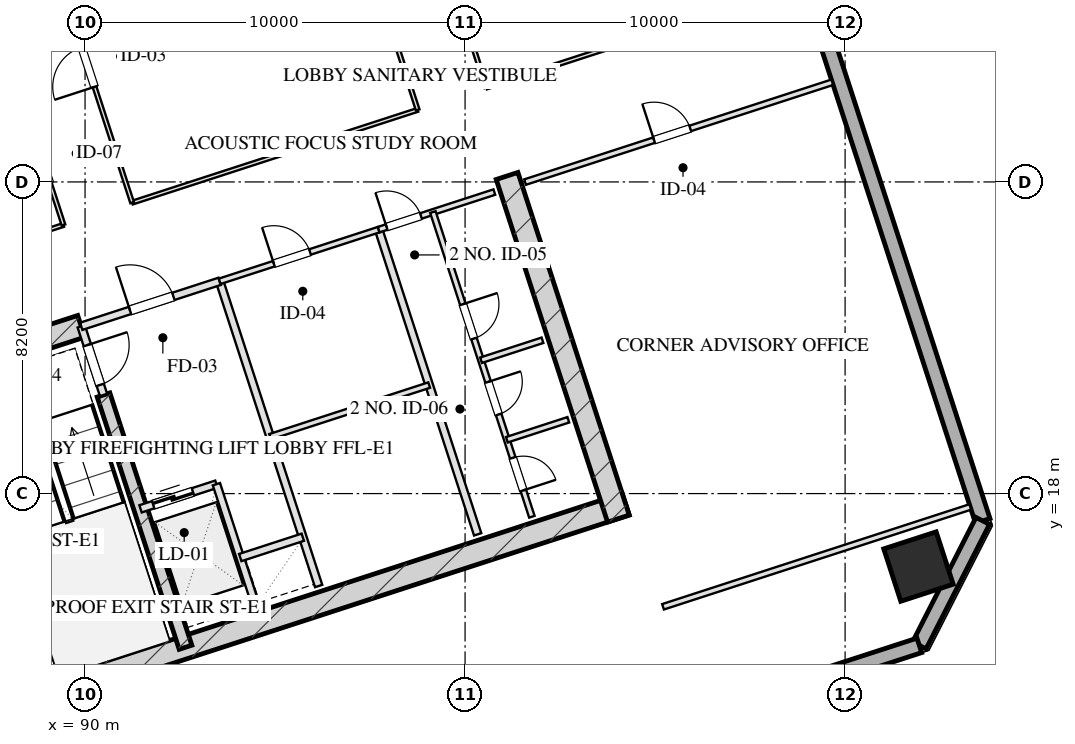
"""IFC4 building model, lengths in metres.
Left out: names, types, materials, properties, quantities, classifications, styles, units other than length and angle.
Written with IfcOpenShell. Run it as: python <this file> out.ifc"""

import sys

from ifc_helpers import new_model, si_unit, direction, frame, frame_2d, origin, origin_2d, place, context, subcontext, project, spatial, rectangle, hollow_rectangle, extrude, element, fill, save


model = new_model("IFC4")
c1 = context("Model", 3, precision=1e-05, world=origin(), true_north=direction((0.0, 1.0)))
c2 = subcontext(c1, "Body", "Model", "MODEL_VIEW")
j1 = project(units=[si_unit("LENGTHUNIT", "METRE"), si_unit("PLANEANGLEUNIT", "RADIAN")], contexts=[c1])
p1 = place(None, origin())
s1 = spatial("IfcSite", under=j1, at=p1, CompositionType="ELEMENT")
p2 = place(p1, origin())
s2 = spatial("IfcBuilding", under=s1, at=p2, CompositionType="ELEMENT")
p3 = place(p2, frame((0.0, 0.0, 106.95)))
s3 = spatial("IfcBuildingStorey", under=s2, at=p3, CompositionType="ELEMENT", Elevation=106.95)
p4 = place(p3, frame((88.63, 12.652, 0.0), z_axis=(0.0, 0.0, 1.0), x_axis=(0.95105714907, 0.309015046886, 0.0)))
e1 = element("IfcWall", 1, at=p4, inside=s3, PredefinedType="SHEAR", context=c2, shape_type="SweptSolid", body=[
    extrude(rectangle(XDim=16.4, YDim=0.6, at=frame_2d((8.2, 0.0))), origin(), (0.0, 0.0, 1.0), 3.45),
])
p5 = place(p3, frame((86.078, 21.475, 0.0), z_axis=(0.0, 0.0, 1.0), x_axis=(0.309017938678, -0.951056209472, 0.0)))
e2 = element("IfcWall", 2, at=p5, inside=s3, PredefinedType="SHEAR", context=c2, shape_type="SweptSolid", body=[
    extrude(rectangle(XDim=9.48, YDim=0.6, at=frame_2d((4.74, 0.0))), origin(), (0.0, 0.0, 1.0), 3.45),
])
p6 = place(p3, frame((101.105, 26.358, 0.0), z_axis=(0.0, 0.0, 1.0), x_axis=(0.309010370028, -0.95105866865, 0.0)))
e3 = element("IfcWall", 3, at=p6, inside=s3, PredefinedType="SHEAR", context=c2, shape_type="SweptSolid", body=[
    extrude(rectangle(XDim=9.48, YDim=0.6, at=frame_2d((4.74, 0.0))), origin(), (0.0, 0.0, 1.0), 3.45),
])
p7 = place(p3, frame((90.486, 20.594, 0.0), z_axis=(0.0, 0.0, 1.0), x_axis=(0.309020428229, -0.951055400562, 0.0)))
e4 = element("IfcWall", 4, at=p7, inside=s3, PredefinedType="SHEAR", context=c2, shape_type="SweptSolid", body=[
    extrude(rectangle(XDim=6.98, YDim=0.35, at=frame_2d((3.49, 0.0))), origin(), (0.0, 0.0, 1.0), 3.45),
])
p8 = place(p3, frame((85.886, 21.097, 0.0), z_axis=(0.0, 0.0, 1.0), x_axis=(0.951068073652, 0.308981422225, 0.0)))
e5 = element("IfcWall", 5, at=p8, inside=s3, PredefinedType="SHEAR", context=c2, shape_type="SweptSolid", body=[
    extrude(rectangle(XDim=4.22, YDim=0.6, at=frame_2d((2.11, 0.0))), origin(), (0.0, 0.0, 1.0), 3.45),
])
p9 = place(p3, frame((111.931, 16.08, 0.0), z_axis=(0.0, 0.0, 1.0), x_axis=(0.951056516295, 0.309016994375, 0.0)))
e6 = element("IfcColumn", 6, at=p9, inside=s3, PredefinedType="COLUMN", context=c2, shape_type="SweptSolid", body=[
    extrude(hollow_rectangle(XDim=1.45, YDim=1.45, WallThickness=0.05, at=origin_2d()), origin(), (0.0, 0.0, 1.0), 3.451),
])
p10 = place(p3, frame((99.284, 61.41, 0.0), z_axis=(0.0, 0.0, 1.0), x_axis=(0.309017542002, -0.95105633836, 0.0)))
e7 = element("IfcWall", 7, at=p10, inside=s3, PredefinedType="SOLIDWALL", context=c2, shape_type="SweptSolid", body=[
    extrude(rectangle(XDim=46.4, YDim=0.4, at=frame_2d((23.2, 0.0))), origin(), (0.0, 0.0, 1.0), 2.61),
])
p11 = place(p10, frame((28.4, 0.0, 0.75)))
e8 = element("IfcOpeningElement", 8, at=p11, cuts=e7, PredefinedType="OPENING", context=c2, shape_type="SweptSolid", body=[
    extrude(rectangle(XDim=2.4, YDim=1.46, at=frame_2d((1.2, 0.73))), frame((0.0, 0.21, 0.0), z_axis=(0.0, -1.0, 0.0), x_axis=(1.0, 0.0, 0.0)), (0.0, 0.0, 1.0), 0.42),
])
p12 = place(p10, frame((15.6, 0.0, 0.75)))
e9 = element("IfcOpeningElement", 9, at=p12, cuts=e7, PredefinedType="OPENING", context=c2, shape_type="SweptSolid", body=[
    extrude(rectangle(XDim=2.4, YDim=1.46, at=frame_2d((1.2, 0.73))), frame((0.0, 0.21, 0.0), z_axis=(0.0, -1.0, 0.0), x_axis=(1.0, 0.0, 0.0)), (0.0, 0.0, 1.0), 0.42),
])
p13 = place(p3, frame((113.623, 17.281, 0.0), z_axis=(0.0, 0.0, 1.0), x_axis=(-0.454026238093, -0.890988313685, 0.0)))
e10 = element("IfcWall", 10, at=p13, inside=s3, PredefinedType="SOLIDWALL", context=c2, shape_type="SweptSolid", body=[
    extrude(rectangle(XDim=3.677, YDim=0.4, at=frame_2d((1.838, 0.0))), origin(), (0.0, 0.0, 1.0), 2.61),
])
p14 = place(p3, frame((111.953, 14.005, 0.0), z_axis=(0.0, 0.0, 1.0), x_axis=(-0.95105505922, -0.309021478754, 0.0)))
e11 = element("IfcWall", 11, at=p14, inside=s3, PredefinedType="SOLIDWALL", context=c2, shape_type="SweptSolid", body=[
    extrude(rectangle(XDim=29.4, YDim=0.4, at=frame_2d((14.7, 0.0))), origin(), (0.0, 0.0, 1.0), 2.61),
])
p15 = place(p3, frame((89.899, 22.401, 0.0), z_axis=(0.0, 0.0, 1.0), x_axis=(0.308932062672, -0.951084108086, 0.0)))
e12 = element("IfcWall", 12, at=p15, inside=s3, PredefinedType="PARTITIONING", context=c2, shape_type="SweptSolid", body=[
    extrude(rectangle(XDim=1.9, YDim=0.2, at=frame_2d((0.95, 0.0))), origin(), (0.0, 0.0, 1.0), 3.175),
])
p16 = place(p15, frame((0.52, 0.0, 0.0)))
e13 = element("IfcOpeningElement", 13, at=p16, cuts=e12, PredefinedType="OPENING", context=c2, shape_type="SweptSolid", body=[
    extrude(rectangle(XDim=1.1, YDim=2.05, at=frame_2d((0.55, 1.025))), frame((0.0, 0.11, 0.0), z_axis=(0.0, -1.0, 0.0), x_axis=(1.0, 0.0, 0.0)), (0.0, 0.0, 1.0), 0.22),
])
p17 = place(p3, frame((93.542, 23.585, 0.0), z_axis=(0.0, 0.0, 1.0), x_axis=(0.309042196757, -0.951048327176, 0.0)))
e14 = element("IfcWall", 14, at=p17, inside=s3, PredefinedType="PARTITIONING", context=c2, shape_type="SweptSolid", body=[
    extrude(rectangle(XDim=8.43, YDim=0.2, at=frame_2d((4.215, 0.0))), origin(), (0.0, 0.0, 1.0), 3.175),
])
p18 = place(p3, frame((89.899, 22.401, 0.0), z_axis=(0.0, 0.0, 1.0), x_axis=(0.951046716504, 0.309047153403, 0.0)))
e15 = element("IfcWall", 15, at=p18, inside=s3, PredefinedType="PARTITIONING", context=c2, shape_type="SweptSolid", body=[
    extrude(rectangle(XDim=3.83, YDim=0.2, at=frame_2d((1.915, 0.0))), origin(), (0.0, 0.0, 1.0), 3.175),
])
p19 = place(p18, frame((1.35, 0.0, 0.0)))
e16 = element("IfcOpeningElement", 16, at=p19, cuts=e15, PredefinedType="OPENING", context=c2, shape_type="SweptSolid", body=[
    extrude(rectangle(XDim=1.2, YDim=2.05, at=frame_2d((0.6, 1.025))), frame((0.0, 0.11, 0.0), z_axis=(0.0, -1.0, 0.0), x_axis=(1.0, 0.0, 0.0)), (0.0, 0.0, 1.0), 0.22),
])
p20 = place(p3, frame((91.46, 17.598, 0.0), z_axis=(0.0, 0.0, 1.0), x_axis=(0.951062257173, 0.308999325213, 0.0)))
e17 = element("IfcWall", 17, at=p20, inside=s3, PredefinedType="PARTITIONING", context=c2, shape_type="SweptSolid", body=[
    extrude(rectangle(XDim=2.1, YDim=0.2, at=frame_2d((1.05, 0.0))), origin(), (0.0, 0.0, 1.0), 3.175),
])
p21 = place(p20, frame((0.35, 0.0, 0.0)))
e18 = element("IfcOpeningElement", 18, at=p21, cuts=e17, PredefinedType="OPENING", context=c2, shape_type="SweptSolid", body=[
    extrude(rectangle(XDim=1.1, YDim=2.05, at=frame_2d((0.55, 1.025))), frame((0.0, 0.11, 0.0), z_axis=(0.0, -1.0, 0.0), x_axis=(1.0, 0.0, 0.0)), (0.0, 0.0, 1.0), 0.22),
])
p22 = place(p3, frame((93.457, 18.247, 0.0), z_axis=(0.0, 0.0, 1.0), x_axis=(0.3089935693, -0.951064127245, 0.0)))
e19 = element("IfcWall", 19, at=p22, inside=s3, PredefinedType="PARTITIONING", context=c2, shape_type="SweptSolid", body=[
    extrude(rectangle(XDim=3.7, YDim=0.2, at=frame_2d((1.85, 0.0))), origin(), (0.0, 0.0, 1.0), 3.175),
])
p23 = place(p3, frame((94.084, 16.317, 0.0), z_axis=(0.0, 0.0, 1.0), x_axis=(0.951041328149, 0.309063734775, 0.0)))
e20 = element("IfcWall", 20, at=p23, inside=s3, PredefinedType="PARTITIONING", context=c2, shape_type="SweptSolid", body=[
    extrude(rectangle(XDim=1.73, YDim=0.2, at=frame_2d((0.865, 0.0))), origin(), (0.0, 0.0, 1.0), 3.175),
])
p24 = place(p3, frame((97.727, 24.944, 0.0), z_axis=(0.0, 0.0, 1.0), x_axis=(0.309016001439, -0.951056838919, 0.0)))
e21 = element("IfcWall", 21, at=p24, inside=s3, PredefinedType="PARTITIONING", context=c2, shape_type="SweptSolid", body=[
    extrude(rectangle(XDim=8.43, YDim=0.2, at=frame_2d((4.215, 0.0))), origin(), (0.0, 0.0, 1.0), 3.175),
])
p25 = place(p3, frame((93.542, 23.585, 0.0), z_axis=(0.0, 0.0, 1.0), x_axis=(0.951063829732, 0.308994485023, 0.0)))
e22 = element("IfcWall", 22, at=p25, inside=s3, PredefinedType="PARTITIONING", context=c2, shape_type="SweptSolid", body=[
    extrude(rectangle(XDim=4.4, YDim=0.15, at=frame_2d((2.2, 0.0))), origin(), (0.0, 0.0, 1.0), 3.175),
])
p26 = place(p25, frame((1.5, 0.0, 0.0)))
e23 = element("IfcOpeningElement", 23, at=p26, cuts=e22, PredefinedType="OPENING", context=c2, shape_type="SweptSolid", body=[
    extrude(rectangle(XDim=1.0, YDim=2.05, at=frame_2d((0.5, 1.025))), frame((0.0, 0.085, 0.0), z_axis=(0.0, -1.0, 0.0), x_axis=(1.0, 0.0, 0.0)), (0.0, 0.0, 1.0), 0.17),
])
p27 = place(p3, frame((94.871, 19.495, 0.0), z_axis=(0.0, 0.0, 1.0), x_axis=(0.951042223598, 0.309060979314, 0.0)))
e24 = element("IfcWall", 24, at=p27, inside=s3, PredefinedType="PARTITIONING", context=c2, shape_type="SweptSolid", body=[
    extrude(rectangle(XDim=4.4, YDim=0.15, at=frame_2d((2.2, 0.0))), origin(), (0.0, 0.0, 1.0), 3.175),
])
p28 = place(p3, frame((97.727, 24.944, 0.0), z_axis=(0.0, 0.0, 1.0), x_axis=(0.951036872128, 0.309077446369, 0.0)))
e25 = element("IfcWall", 25, at=p28, inside=s3, PredefinedType="PARTITIONING", context=c2, shape_type="SweptSolid", body=[
    extrude(rectangle(XDim=3.2, YDim=0.15, at=frame_2d((1.6, 0.0))), origin(), (0.0, 0.0, 1.0), 3.175),
])
p29 = place(p28, frame((0.22, 0.0, 0.0)))
e26 = element("IfcOpeningElement", 26, at=p29, cuts=e25, PredefinedType="OPENING", context=c2, shape_type="SweptSolid", body=[
    extrude(rectangle(XDim=0.95, YDim=2.05, at=frame_2d((0.475, 1.025))), frame((0.0, 0.085, 0.0), z_axis=(0.0, -1.0, 0.0), x_axis=(1.0, 0.0, 0.0)), (0.0, 0.0, 1.0), 0.17),
])
p30 = place(p3, frame((99.153, 25.408, 0.0), z_axis=(0.0, 0.0, 1.0), x_axis=(0.309016001439, -0.951056838919, 0.0)))
e27 = element("IfcWall", 27, at=p30, inside=s3, PredefinedType="PARTITIONING", context=c2, shape_type="SweptSolid", body=[
    extrude(rectangle(XDim=8.43, YDim=0.15, at=frame_2d((4.215, 0.0))), origin(), (0.0, 0.0, 1.0), 3.175),
])
p31 = place(p30, frame((2.55, 0.0, 0.0)))
e28 = element("IfcOpeningElement", 28, at=p31, cuts=e27, PredefinedType="OPENING", context=c2, shape_type="SweptSolid", body=[
    extrude(rectangle(XDim=0.95, YDim=2.05, at=frame_2d((0.475, 1.025))), frame((0.0, 0.085, 0.0), z_axis=(0.0, -1.0, 0.0), x_axis=(1.0, 0.0, 0.0)), (0.0, 0.0, 1.0), 0.17),
])
p32 = place(p30, frame((4.7, 0.0, 0.0)))
e29 = element("IfcOpeningElement", 29, at=p32, cuts=e27, PredefinedType="OPENING", context=c2, shape_type="SweptSolid", body=[
    extrude(rectangle(XDim=0.9, YDim=2.05, at=frame_2d((0.45, 1.025))), frame((0.0, 0.085, 0.0), z_axis=(0.0, -1.0, 0.0), x_axis=(1.0, 0.0, 0.0)), (0.0, 0.0, 1.0), 0.17),
])
p33 = place(p30, frame((6.8, 0.0, 0.0)))
e30 = element("IfcOpeningElement", 30, at=p33, cuts=e27, PredefinedType="OPENING", context=c2, shape_type="SweptSolid", body=[
    extrude(rectangle(XDim=0.9, YDim=2.05, at=frame_2d((0.45, 1.025))), frame((0.0, 0.085, 0.0), z_axis=(0.0, -1.0, 0.0), x_axis=(1.0, 0.0, 0.0)), (0.0, 0.0, 1.0), 0.17),
])
p34 = place(p3, frame((100.42, 21.509, 0.0), z_axis=(0.0, 0.0, 1.0), x_axis=(0.951040401051, 0.309066587596, 0.0)))
e31 = element("IfcWall", 31, at=p34, inside=s3, PredefinedType="PARTITIONING", context=c2, shape_type="SweptSolid", body=[
    extrude(rectangle(XDim=1.7, YDim=0.15, at=frame_2d((0.85, 0.0))), origin(), (0.0, 0.0, 1.0), 3.175),
])
p35 = place(p3, frame((101.1, 19.416, 0.0), z_axis=(0.0, 0.0, 1.0), x_axis=(0.951054116971, 0.309024378638, 0.0)))
e32 = element("IfcWall", 32, at=p35, inside=s3, PredefinedType="PARTITIONING", context=c2, shape_type="SweptSolid", body=[
    extrude(rectangle(XDim=1.7, YDim=0.15, at=frame_2d((0.85, 0.0))), origin(), (0.0, 0.0, 1.0), 3.175),
])
p36 = place(p3, frame((105.209, 15.021, 0.0), z_axis=(0.0, 0.0, 1.0), x_axis=(0.951054329824, 0.309023723562, 0.0)))
e33 = element("IfcWall", 33, at=p36, inside=s3, PredefinedType="PARTITIONING", context=c2, shape_type="SweptSolid", body=[
    extrude(rectangle(XDim=8.5, YDim=0.15, at=frame_2d((4.25, 0.0))), origin(), (0.0, 0.0, 1.0), 3.175),
])
p37 = place(p3, frame((101.578, 26.196, 0.0), z_axis=(0.0, 0.0, 1.0), x_axis=(0.951062770994, 0.308997743729, 0.0)))
e34 = element("IfcWall", 34, at=p37, inside=s3, PredefinedType="PARTITIONING", context=c2, shape_type="SweptSolid", body=[
    extrude(rectangle(XDim=8.5, YDim=0.15, at=frame_2d((4.25, 0.0))), origin(), (0.0, 0.0, 1.0), 3.175),
])
p38 = place(p37, frame((3.57, 0.0, 0.0)))
e35 = element("IfcOpeningElement", 35, at=p38, cuts=e34, PredefinedType="OPENING", context=c2, shape_type="SweptSolid", body=[
    extrude(rectangle(XDim=1.0, YDim=2.05, at=frame_2d((0.5, 1.025))), frame((0.0, 0.085, 0.0), z_axis=(0.0, -1.0, 0.0), x_axis=(1.0, 0.0, 0.0)), (0.0, 0.0, 1.0), 0.17),
])
p39 = place(p3, frame((76.308, 20.803, 0.0), z_axis=(0.0, 0.0, 1.0), x_axis=(0.951058377365, 0.309011266531, 0.0)))
e36 = element("IfcWall", 36, at=p39, inside=s3, PredefinedType="MOVABLE", context=c2, shape_type="SweptSolid", body=[
    extrude(rectangle(XDim=13.8, YDim=0.1, at=frame_2d((6.9, 0.0))), origin(), (0.0, 0.0, 1.0), 3.175),
])
p40 = place(p3, frame((91.24, 25.655, 0.0), z_axis=(0.0, 0.0, 1.0), x_axis=(0.951060182336, 0.309005711233, 0.0)))
e37 = element("IfcWall", 37, at=p40, inside=s3, PredefinedType="MOVABLE", context=c2, shape_type="SweptSolid", body=[
    extrude(rectangle(XDim=7.9, YDim=0.1, at=frame_2d((3.95, 0.0))), origin(), (0.0, 0.0, 1.0), 3.175),
])
p41 = place(p3, frame((100.56, 28.683, 0.0), z_axis=(0.0, 0.0, 1.0), x_axis=(0.951055307445, 0.309020714809, 0.0)))
e38 = element("IfcWall", 38, at=p41, inside=s3, PredefinedType="MOVABLE", context=c2, shape_type="SweptSolid", body=[
    extrude(rectangle(XDim=8.7, YDim=0.1, at=frame_2d((4.35, 0.0))), origin(), (0.0, 0.0, 1.0), 3.175),
])
p42 = place(p3, frame((89.433, 25.067, 0.0), z_axis=(0.0, 0.0, 1.0), x_axis=(-0.30901773025, 0.951056277195, 0.0)))
e39 = element("IfcWall", 39, at=p42, inside=s3, PredefinedType="MOVABLE", context=c2, shape_type="SweptSolid", body=[
    extrude(rectangle(XDim=16.64, YDim=0.1, at=frame_2d((8.32, 0.0))), origin(), (0.0, 0.0, 1.0), 3.175),
])
p43 = place(p42, frame((1.16, 0.0, 0.0)))
e40 = element("IfcOpeningElement", 40, at=p43, cuts=e39, PredefinedType="OPENING", context=c2, shape_type="SweptSolid", body=[
    extrude(rectangle(XDim=1.05, YDim=2.05, at=frame_2d((0.525, 1.025))), frame((0.0, 0.06, 0.0), z_axis=(0.0, -1.0, 0.0), x_axis=(1.0, 0.0, 0.0)), (0.0, 0.0, 1.0), 0.12),
])
p44 = place(p42, frame((6.16, 0.0, 0.0)))
e41 = element("IfcOpeningElement", 41, at=p44, cuts=e39, PredefinedType="OPENING", context=c2, shape_type="SweptSolid", body=[
    extrude(rectangle(XDim=1.0, YDim=2.05, at=frame_2d((0.5, 1.025))), frame((0.0, 0.06, 0.0), z_axis=(0.0, -1.0, 0.0), x_axis=(1.0, 0.0, 0.0)), (0.0, 0.0, 1.0), 0.12),
])
p45 = place(p42, frame((10.16, 0.0, 0.0)))
e42 = element("IfcOpeningElement", 42, at=p45, cuts=e39, PredefinedType="OPENING", context=c2, shape_type="SweptSolid", body=[
    extrude(rectangle(XDim=1.0, YDim=2.05, at=frame_2d((0.5, 1.025))), frame((0.0, 0.06, 0.0), z_axis=(0.0, -1.0, 0.0), x_axis=(1.0, 0.0, 0.0)), (0.0, 0.0, 1.0), 0.12),
])
p46 = place(p42, frame((14.48, 0.0, 0.0)))
e43 = element("IfcOpeningElement", 43, at=p46, cuts=e39, PredefinedType="OPENING", context=c2, shape_type="SweptSolid", body=[
    extrude(rectangle(XDim=1.0, YDim=2.05, at=frame_2d((0.5, 1.025))), frame((0.0, 0.06, 0.0), z_axis=(0.0, -1.0, 0.0), x_axis=(1.0, 0.0, 0.0)), (0.0, 0.0, 1.0), 0.12),
])
p47 = place(p3, frame((91.24, 25.655, 0.0), z_axis=(0.0, 0.0, 1.0), x_axis=(-0.30901773025, 0.951056277195, 0.0)))
e44 = element("IfcWall", 44, at=p47, inside=s3, PredefinedType="MOVABLE", context=c2, shape_type="SweptSolid", body=[
    extrude(rectangle(XDim=16.64, YDim=0.1, at=frame_2d((8.32, 0.0))), origin(), (0.0, 0.0, 1.0), 3.175),
])
p48 = place(p47, frame((3.204, 0.0, 0.0)))
e45 = element("IfcOpeningElement", 45, at=p48, cuts=e44, PredefinedType="OPENING", context=c2, shape_type="SweptSolid", body=[
    extrude(rectangle(XDim=1.1, YDim=2.05, at=frame_2d((0.55, 1.025))), frame((0.0, 0.06, 0.0), z_axis=(0.0, -1.0, 0.0), x_axis=(1.0, 0.0, 0.0)), (0.0, 0.0, 1.0), 0.12),
])
p49 = place(p47, frame((11.404, 0.0, 0.0)))
e46 = element("IfcOpeningElement", 46, at=p49, cuts=e44, PredefinedType="OPENING", context=c2, shape_type="SweptSolid", body=[
    extrude(rectangle(XDim=1.1, YDim=2.05, at=frame_2d((0.55, 1.025))), frame((0.0, 0.06, 0.0), z_axis=(0.0, -1.0, 0.0), x_axis=(1.0, 0.0, 0.0)), (0.0, 0.0, 1.0), 0.12),
])
p50 = place(p3, frame((98.753, 28.096, 0.0), z_axis=(0.0, 0.0, 1.0), x_axis=(-0.30901773025, 0.951056277195, 0.0)))
e47 = element("IfcWall", 47, at=p50, inside=s3, PredefinedType="MOVABLE", context=c2, shape_type="SweptSolid", body=[
    extrude(rectangle(XDim=16.64, YDim=0.1, at=frame_2d((8.32, 0.0))), origin(), (0.0, 0.0, 1.0), 3.175),
])
p51 = place(p3, frame((100.56, 28.683, 0.0), z_axis=(0.0, 0.0, 1.0), x_axis=(-0.309004459387, 0.951060589068, 0.0)))
e48 = element("IfcWall", 48, at=p51, inside=s3, PredefinedType="MOVABLE", context=c2, shape_type="SweptSolid", body=[
    extrude(rectangle(XDim=16.64, YDim=0.1, at=frame_2d((8.32, 0.0))), origin(), (0.0, 0.0, 1.0), 3.175),
])
p52 = place(p51, frame((1.66, 0.0, 0.0)))
e49 = element("IfcOpeningElement", 49, at=p52, cuts=e48, PredefinedType="OPENING", context=c2, shape_type="SweptSolid", body=[
    extrude(rectangle(XDim=0.85, YDim=2.05, at=frame_2d((0.425, 1.025))), frame((0.0, 0.06, 0.0), z_axis=(0.0, -1.0, 0.0), x_axis=(1.0, 0.0, 0.0)), (0.0, 0.0, 1.0), 0.12),
])
p53 = place(p51, frame((7.82, 0.0, 0.0)))
e50 = element("IfcOpeningElement", 50, at=p53, cuts=e48, PredefinedType="OPENING", context=c2, shape_type="SweptSolid", body=[
    extrude(rectangle(XDim=1.05, YDim=2.05, at=frame_2d((0.525, 1.025))), frame((0.0, 0.06, 0.0), z_axis=(0.0, -1.0, 0.0), x_axis=(1.0, 0.0, 0.0)), (0.0, 0.0, 1.0), 0.12),
])
p54 = place(p51, frame((13.98, 0.0, 0.0)))
e51 = element("IfcOpeningElement", 51, at=p54, cuts=e48, PredefinedType="OPENING", context=c2, shape_type="SweptSolid", body=[
    extrude(rectangle(XDim=1.0, YDim=2.05, at=frame_2d((0.5, 1.025))), frame((0.0, 0.06, 0.0), z_axis=(0.0, -1.0, 0.0), x_axis=(1.0, 0.0, 0.0)), (0.0, 0.0, 1.0), 0.12),
])
p55 = place(p16, origin())
e52 = element("IfcDoor", 52, at=p55, inside=s3, OperationType="SINGLE_SWING_LEFT", PredefinedType="DOOR", context=c2, shape_type="SweptSolid", body=[
    extrude(rectangle(XDim=1.1, YDim=2.05, at=frame_2d((0.55, 1.025))), frame((0.0, 0.025, 0.0), z_axis=(0.0, -1.0, 0.0), x_axis=(1.0, 0.0, 0.0)), (0.0, 0.0, 1.0), 0.05),
])
fill(e13, e52)
p56 = place(p19, origin())
e53 = element("IfcDoor", 53, at=p56, inside=s3, OperationType="SINGLE_SWING_LEFT", PredefinedType="DOOR", context=c2, shape_type="SweptSolid", body=[
    extrude(rectangle(XDim=1.2, YDim=2.05, at=frame_2d((0.6, 1.025))), frame((0.0, 0.025, 0.0), z_axis=(0.0, -1.0, 0.0), x_axis=(1.0, 0.0, 0.0)), (0.0, 0.0, 1.0), 0.05),
])
fill(e16, e53)
p57 = place(p21, origin())
e54 = element("IfcDoor", 54, at=p57, inside=s3, OperationType="DOUBLE_DOOR_SLIDING", PredefinedType="DOOR", context=c2, shape_type="SweptSolid", body=[
    extrude(rectangle(XDim=1.1, YDim=2.05, at=frame_2d((0.55, 1.025))), frame((0.0, 0.025, 0.0), z_axis=(0.0, -1.0, 0.0), x_axis=(1.0, 0.0, 0.0)), (0.0, 0.0, 1.0), 0.05),
])
fill(e18, e54)
p58 = place(p26, origin())
e55 = element("IfcDoor", 55, at=p58, inside=s3, OperationType="SINGLE_SWING_LEFT", PredefinedType="DOOR", context=c2, shape_type="SweptSolid", body=[
    extrude(rectangle(XDim=1.0, YDim=2.05, at=frame_2d((0.5, 1.025))), frame((0.0, 0.025, 0.0), z_axis=(0.0, -1.0, 0.0), x_axis=(1.0, 0.0, 0.0)), (0.0, 0.0, 1.0), 0.05),
])
fill(e23, e55)
p59 = place(p29, origin())
e56 = element("IfcDoor", 56, at=p59, inside=s3, OperationType="SINGLE_SWING_LEFT", PredefinedType="DOOR", context=c2, shape_type="SweptSolid", body=[
    extrude(rectangle(XDim=0.95, YDim=2.05, at=frame_2d((0.475, 1.025))), frame((0.0, 0.025, 0.0), z_axis=(0.0, -1.0, 0.0), x_axis=(1.0, 0.0, 0.0)), (0.0, 0.0, 1.0), 0.05),
])
fill(e26, e56)
p60 = place(p31, origin())
e57 = element("IfcDoor", 57, at=p60, inside=s3, OperationType="SINGLE_SWING_LEFT", PredefinedType="DOOR", context=c2, shape_type="SweptSolid", body=[
    extrude(rectangle(XDim=0.95, YDim=2.05, at=frame_2d((0.475, 1.025))), frame((0.0, 0.025, 0.0), z_axis=(0.0, -1.0, 0.0), x_axis=(1.0, 0.0, 0.0)), (0.0, 0.0, 1.0), 0.05),
])
fill(e28, e57)
p61 = place(p32, origin())
e58 = element("IfcDoor", 58, at=p61, inside=s3, OperationType="SINGLE_SWING_LEFT", PredefinedType="DOOR", context=c2, shape_type="SweptSolid", body=[
    extrude(rectangle(XDim=0.9, YDim=2.05, at=frame_2d((0.45, 1.025))), frame((0.0, 0.025, 0.0), z_axis=(0.0, -1.0, 0.0), x_axis=(1.0, 0.0, 0.0)), (0.0, 0.0, 1.0), 0.05),
])
fill(e29, e58)
p62 = place(p33, origin())
e59 = element("IfcDoor", 59, at=p62, inside=s3, OperationType="SINGLE_SWING_RIGHT", PredefinedType="DOOR", context=c2, shape_type="SweptSolid", body=[
    extrude(rectangle(XDim=0.9, YDim=2.05, at=frame_2d((0.45, 1.025))), frame((0.0, 0.025, 0.0), z_axis=(0.0, -1.0, 0.0), x_axis=(1.0, 0.0, 0.0)), (0.0, 0.0, 1.0), 0.05),
])
fill(e30, e59)
p63 = place(p38, origin())
e60 = element("IfcDoor", 60, at=p63, inside=s3, OperationType="SINGLE_SWING_LEFT", PredefinedType="DOOR", context=c2, shape_type="SweptSolid", body=[
    extrude(rectangle(XDim=1.0, YDim=2.05, at=frame_2d((0.5, 1.025))), frame((0.0, 0.025, 0.0), z_axis=(0.0, -1.0, 0.0), x_axis=(1.0, 0.0, 0.0)), (0.0, 0.0, 1.0), 0.05),
])
fill(e35, e60)
p64 = place(p48, origin())
e61 = element("IfcDoor", 61, at=p64, inside=s3, OperationType="SINGLE_SWING_LEFT", PredefinedType="DOOR", context=c2, shape_type="SweptSolid", body=[
    extrude(rectangle(XDim=1.1, YDim=2.05, at=frame_2d((0.55, 1.025))), frame((0.0, 0.025, 0.0), z_axis=(0.0, -1.0, 0.0), x_axis=(1.0, 0.0, 0.0)), (0.0, 0.0, 1.0), 0.05),
])
fill(e45, e61)
save(model, sys.argv[1])
